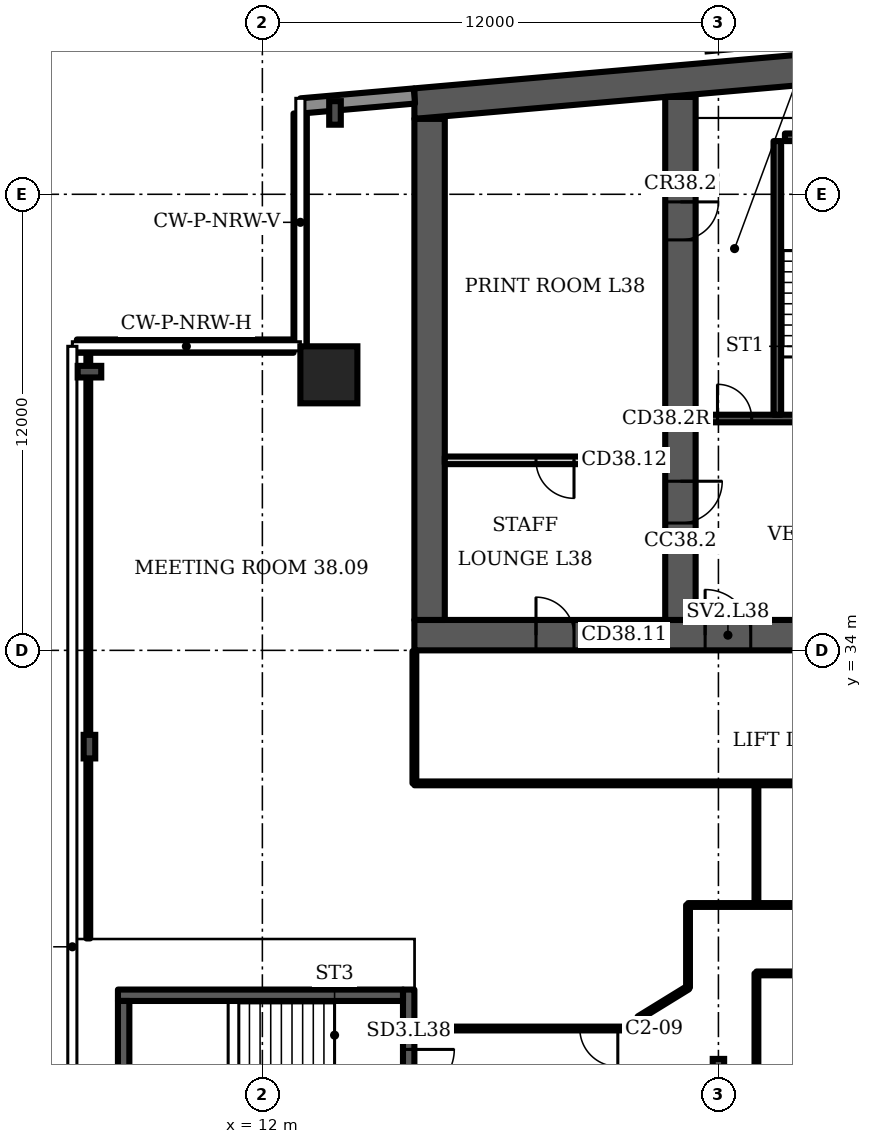
"""IFC4 building model, lengths in metres.
Left out: names, types, materials, properties, quantities, classifications, styles, units other than length and angle.
Written with IfcOpenShell. Run it as: python <this file> out.ifc"""

import sys

from ifc_helpers import new_model, si_unit, direction, frame, frame_2d, origin, origin_2d, place, context, subcontext, project, spatial, polyline, rectangle, i_section, outline, extrude, element, fill, save


model = new_model("IFC4")
c1 = context("Model", 3, precision=1e-05, world=origin(), true_north=direction((0.0, 1.0)))
c2 = subcontext(c1, "Body", "Model", "MODEL_VIEW")
j1 = project(units=[si_unit("LENGTHUNIT", "METRE"), si_unit("PLANEANGLEUNIT", "RADIAN")], contexts=[c1])
p1 = place(None, origin())
s1 = spatial("IfcSite", under=j1, at=p1, CompositionType="ELEMENT")
p2 = place(p1, origin())
s2 = spatial("IfcBuilding", under=s1, at=p2, CompositionType="ELEMENT")
p3 = place(p2, frame((0.0, 0.0, 159.1)))
s3 = spatial("IfcBuildingStorey", under=s2, at=p3, CompositionType="ELEMENT", Elevation=159.1)
p4 = place(p3, frame((0.0, 0.0, -0.0)))
e1 = element("IfcWall", 1, at=p4, inside=s3, PredefinedType="SHEAR", context=c2, shape_type="SweptSolid", body=[
    extrude(outline(polyline([(16.0, 47.984), (37.0, 49.822), (58.0, 47.984), (58.0, 48.787), (37.0, 50.625), (16.0, 48.787), (16.0, 47.984)])), origin(), (0.0, 0.0, 1.0), 3.6),
])
p5 = place(p3, frame((16.0, 34.4, 0.0), z_axis=(0.0, 0.0, 1.0), x_axis=(1.0, 0.0, 0.0)))
e2 = element("IfcWall", 2, at=p5, inside=s3, PredefinedType="SHEAR", context=c2, shape_type="SweptSolid", body=[
    extrude(rectangle(XDim=42.0, YDim=0.8, at=frame_2d((21.0, 0.0))), origin(), (0.0, 0.0, 1.0), 3.6),
])
p6 = place(p5, frame((3.2, 0.0, 0.0)))
e3 = element("IfcOpeningElement", 3, at=p6, cuts=e2, PredefinedType="OPENING", context=c2, shape_type="SweptSolid", body=[
    extrude(rectangle(XDim=1.0, YDim=2.1, at=frame_2d((0.5, 1.05))), frame((0.0, 0.41, 0.0), z_axis=(0.0, -1.0, 0.0), x_axis=(1.0, 0.0, 0.0)), (0.0, 0.0, 1.0), 0.82),
])
p7 = place(p5, frame((7.65, 0.0, 0.0)))
e4 = element("IfcOpeningElement", 4, at=p7, cuts=e2, PredefinedType="OPENING", context=c2, shape_type="SweptSolid", body=[
    extrude(rectangle(XDim=1.2, YDim=2.1, at=frame_2d((0.6, 1.05))), frame((0.0, 0.41, 0.0), z_axis=(0.0, -1.0, 0.0), x_axis=(1.0, 0.0, 0.0)), (0.0, 0.0, 1.0), 0.82),
])
p8 = place(p5, frame((14.767, 0.0, 0.0)))
e5 = element("IfcOpeningElement", 5, at=p8, cuts=e2, PredefinedType="OPENING", context=c2, shape_type="SweptSolid", body=[
    extrude(rectangle(XDim=1.1, YDim=2.1, at=frame_2d((0.55, 1.05))), frame((0.0, 0.41, 0.0), z_axis=(0.0, -1.0, 0.0), x_axis=(1.0, 0.0, 0.0)), (0.0, 0.0, 1.0), 0.82),
])
p9 = place(p5, frame((19.133, 0.0, 0.0)))
e6 = element("IfcOpeningElement", 6, at=p9, cuts=e2, PredefinedType="OPENING", context=c2, shape_type="SweptSolid", body=[
    extrude(rectangle(XDim=1.1, YDim=2.1, at=frame_2d((0.55, 1.05))), frame((0.0, 0.41, 0.0), z_axis=(0.0, -1.0, 0.0), x_axis=(1.0, 0.0, 0.0)), (0.0, 0.0, 1.0), 0.82),
])
p10 = place(p5, frame((16.8, 0.0, 0.0)))
e7 = element("IfcOpeningElement", 7, at=p10, cuts=e2, PredefinedType="OPENING", context=c2, shape_type="SweptSolid", body=[
    extrude(rectangle(XDim=1.4, YDim=2.1, at=frame_2d((0.7, 1.05))), frame((0.0, 0.41, 0.0), z_axis=(0.0, -1.0, 0.0), x_axis=(1.0, 0.0, 0.0)), (0.0, 0.0, 1.0), 0.82),
])
p11 = place(p5, frame((21.767, 0.0, 0.0)))
e8 = element("IfcOpeningElement", 8, at=p11, cuts=e2, PredefinedType="OPENING", context=c2, shape_type="SweptSolid", body=[
    extrude(rectangle(XDim=1.1, YDim=2.1, at=frame_2d((0.55, 1.05))), frame((0.0, 0.41, 0.0), z_axis=(0.0, -1.0, 0.0), x_axis=(1.0, 0.0, 0.0)), (0.0, 0.0, 1.0), 0.82),
])
p12 = place(p5, frame((23.95, 0.0, 0.0)))
e9 = element("IfcOpeningElement", 9, at=p12, cuts=e2, PredefinedType="OPENING", context=c2, shape_type="SweptSolid", body=[
    extrude(rectangle(XDim=1.1, YDim=2.1, at=frame_2d((0.55, 1.05))), frame((0.0, 0.41, 0.0), z_axis=(0.0, -1.0, 0.0), x_axis=(1.0, 0.0, 0.0)), (0.0, 0.0, 1.0), 0.82),
])
p13 = place(p5, frame((26.133, 0.0, 0.0)))
e10 = element("IfcOpeningElement", 10, at=p13, cuts=e2, PredefinedType="OPENING", context=c2, shape_type="SweptSolid", body=[
    extrude(rectangle(XDim=1.1, YDim=2.1, at=frame_2d((0.55, 1.05))), frame((0.0, 0.41, 0.0), z_axis=(0.0, -1.0, 0.0), x_axis=(1.0, 0.0, 0.0)), (0.0, 0.0, 1.0), 0.82),
])
p14 = place(p5, frame((33.15, 0.0, 0.0)))
e11 = element("IfcOpeningElement", 11, at=p14, cuts=e2, PredefinedType="OPENING", context=c2, shape_type="SweptSolid", body=[
    extrude(rectangle(XDim=1.2, YDim=2.1, at=frame_2d((0.6, 1.05))), frame((0.0, 0.41, 0.0), z_axis=(0.0, -1.0, 0.0), x_axis=(1.0, 0.0, 0.0)), (0.0, 0.0, 1.0), 0.82),
])
p15 = place(p5, frame((37.767, 0.0, 0.0)))
e12 = element("IfcOpeningElement", 12, at=p15, cuts=e2, PredefinedType="OPENING", context=c2, shape_type="SweptSolid", body=[
    extrude(rectangle(XDim=1.4, YDim=2.1, at=frame_2d((0.7, 1.05))), frame((0.0, 0.41, 0.0), z_axis=(0.0, -1.0, 0.0), x_axis=(1.0, 0.0, 0.0)), (0.0, 0.0, 1.0), 0.82),
])
p16 = place(p3, frame((16.4, 34.8, 0.0), z_axis=(0.0, 0.0, 1.0), x_axis=(0.0, 1.0, 0.0)))
e13 = element("IfcWall", 13, at=p16, inside=s3, PredefinedType="SHEAR", context=c2, shape_type="SweptSolid", body=[
    extrude(rectangle(XDim=13.184, YDim=0.8, at=frame_2d((6.592, 0.0))), origin(), (0.0, 0.0, 1.0), 3.6),
])
p17 = place(p3, frame((23.0, 34.8, 0.0), z_axis=(0.0, 0.0, 1.0), x_axis=(0.0, 1.0, 0.0)))
e14 = element("IfcWall", 14, at=p17, inside=s3, PredefinedType="SHEAR", context=c2, shape_type="SweptSolid", body=[
    extrude(rectangle(XDim=13.762, YDim=0.8, at=frame_2d((6.881, 0.0))), origin(), (0.0, 0.0, 1.0), 3.6),
])
p18 = place(p17, frame((2.55, 0.0, 0.0)))
e15 = element("IfcOpeningElement", 15, at=p18, cuts=e14, PredefinedType="OPENING", context=c2, shape_type="SweptSolid", body=[
    extrude(rectangle(XDim=1.1, YDim=2.1, at=frame_2d((0.55, 1.05))), frame((0.0, 0.41, 0.0), z_axis=(0.0, -1.0, 0.0), x_axis=(1.0, 0.0, 0.0)), (0.0, 0.0, 1.0), 0.82),
])
p19 = place(p17, frame((10.0, 0.0, 0.0)))
e16 = element("IfcOpeningElement", 16, at=p19, cuts=e14, PredefinedType="OPENING", context=c2, shape_type="SweptSolid", body=[
    extrude(rectangle(XDim=1.0, YDim=2.1, at=frame_2d((0.5, 1.05))), frame((0.0, 0.41, 0.0), z_axis=(0.0, -1.0, 0.0), x_axis=(1.0, 0.0, 0.0)), (0.0, 0.0, 1.0), 0.82),
])
p20 = place(p3, frame((13.75, 41.25, 0.0), z_axis=(0.0, 0.0, 1.0), x_axis=(1.0, 0.0, 0.0)))
e17 = element("IfcColumn", 17, at=p20, inside=s3, PredefinedType="COLUMN", context=c2, shape_type="SweptSolid", body=[
    extrude(rectangle(XDim=1.5, YDim=1.5, at=origin_2d()), origin(), (0.0, 0.0, 1.0), 3.6),
])
for number, where, z_axis, x_axis in (
    (18, (13.911, 48.141, 0.0), (0.0, 0.0, 1.0), (-1.0, 0.0, 0.0)),
    (19, (7.45, 41.333, 0.0), (0.0, 0.0, 1.0), (0.0, 1.0, 0.0)),
    (20, (7.45, 31.467, 0.0), (0.0, 0.0, 1.0), (-1.0, 0.0, 0.0)),
):
    element("IfcColumn", number, at=place(p3, frame(where, z_axis=z_axis, x_axis=x_axis)), inside=s3, PredefinedType="COLUMN", context=c2, shape_type="SweptSolid", body=[
        extrude(i_section(OverallWidth=0.305, OverallDepth=0.62, WebThickness=0.021, FlangeThickness=0.04, FilletRadius=0.027, at=origin_2d()), origin(), (0.0, 0.0, 1.0), 3.6),
    ])
p21 = place(p3, frame((24.0, 23.0, 0.0), z_axis=(0.0, 0.0, 1.0), x_axis=(1.0, 0.0, 0.0)))
e21 = element("IfcColumn", 21, at=p21, inside=s3, PredefinedType="COLUMN", context=c2, shape_type="SweptSolid", body=[
    extrude(i_section(OverallWidth=0.3, OverallDepth=0.5, WebThickness=0.014, FlangeThickness=0.028, FilletRadius=0.027, at=origin_2d()), origin(), (0.0, 0.0, 1.0), 3.6),
])
p22 = place(p3, frame((16.0, 48.587, 0.0), z_axis=(0.0, 0.0, 1.0), x_axis=(-0.996194, -0.087168, 0.0)))
e22 = element("IfcWall", 22, at=p22, inside=s3, PredefinedType="SOLIDWALL", context=c2, shape_type="SweptSolid", body=[
    extrude(rectangle(XDim=2.994, YDim=0.4, at=frame_2d((1.497, 0.0))), origin(), (0.0, 0.0, 1.0), 3.2),
])
p23 = place(p3, frame((12.995, 48.126, 0.0), z_axis=(0.0, 0.0, 1.0), x_axis=(0.0, -1.0, 0.0)))
e23 = element("IfcWall", 23, at=p23, inside=s3, PredefinedType="SOLIDWALL", context=c2, shape_type="SweptSolid", body=[
    extrude(rectangle(XDim=6.126, YDim=0.35, at=frame_2d((3.063, 0.0))), origin(), (0.0, 0.0, 1.0), 1.0),
])
p24 = place(p3, frame((12.82, 42.005, 0.0), z_axis=(0.0, 0.0, 1.0), x_axis=(-1.0, 0.0, 0.0)))
e24 = element("IfcWall", 24, at=p24, inside=s3, PredefinedType="SOLIDWALL", context=c2, shape_type="SweptSolid", body=[
    extrude(rectangle(XDim=5.7, YDim=0.35, at=frame_2d((2.85, 0.0))), origin(), (0.0, 0.0, 1.0), 1.0),
])
p25 = place(p3, frame((16.8, 39.0, 0.0), z_axis=(0.0, 0.0, 1.0), x_axis=(1.0, 0.0, 0.0)))
e25 = element("IfcWall", 25, at=p25, inside=s3, PredefinedType="PARTITIONING", context=c2, shape_type="SweptSolid", body=[
    extrude(rectangle(XDim=5.8, YDim=0.2, at=frame_2d((2.9, 0.0))), origin(), (0.0, 0.0, 1.0), 3.2),
])
p26 = place(p25, frame((2.4, 0.0, 0.0)))
e26 = element("IfcOpeningElement", 26, at=p26, cuts=e25, PredefinedType="OPENING", context=c2, shape_type="SweptSolid", body=[
    extrude(rectangle(XDim=1.0, YDim=2.1, at=frame_2d((0.5, 1.05))), frame((0.0, 0.11, 0.0), z_axis=(0.0, -1.0, 0.0), x_axis=(1.0, 0.0, 0.0)), (0.0, 0.0, 1.0), 0.22),
])
p27 = place(p3, frame((23.4, 40.1, 0.0), z_axis=(0.0, 0.0, 1.0), x_axis=(1.0, 0.0, 0.0)))
e27 = element("IfcWall", 27, at=p27, inside=s3, PredefinedType="SHEAR", context=c2, shape_type="SweptSolid", body=[
    extrude(rectangle(XDim=6.2, YDim=0.2, at=frame_2d((3.1, 0.0))), origin(), (0.0, 0.0, 1.0), 3.2),
])
p28 = place(p27, frame((3.525, 0.0, 0.0)))
e28 = element("IfcOpeningElement", 28, at=p28, cuts=e27, PredefinedType="OPENING", context=c2, shape_type="SweptSolid", body=[
    extrude(rectangle(XDim=1.2, YDim=2.1, at=frame_2d((0.6, 1.05))), frame((0.0, 0.11, 0.0), z_axis=(0.0, -1.0, 0.0), x_axis=(1.0, 0.0, 0.0)), (0.0, 0.0, 1.0), 0.22),
])
p29 = place(p27, frame((0.575, 0.0, 0.0)))
e29 = element("IfcOpeningElement", 29, at=p29, cuts=e27, PredefinedType="OPENING", context=c2, shape_type="SweptSolid", body=[
    extrude(rectangle(XDim=0.9, YDim=2.1, at=frame_2d((0.45, 1.05))), frame((0.0, 0.11, 0.0), z_axis=(0.0, -1.0, 0.0), x_axis=(1.0, 0.0, 0.0)), (0.0, 0.0, 1.0), 0.22),
])
p30 = place(p3, frame((25.55, 40.2, 0.0), z_axis=(0.0, 0.0, 1.0), x_axis=(0.0, 1.0, 0.0)))
e30 = element("IfcWall", 30, at=p30, inside=s3, PredefinedType="SHEAR", context=c2, shape_type="SweptSolid", body=[
    extrude(rectangle(XDim=7.2, YDim=0.2, at=frame_2d((3.6, 0.0))), origin(), (0.0, 0.0, 1.0), 3.2),
])
p31 = place(p3, frame((25.75, 47.5, 0.0), z_axis=(0.0, 0.0, 1.0), x_axis=(1.0, 0.0, 0.0)))
e31 = element("IfcWall", 31, at=p31, inside=s3, PredefinedType="SHEAR", context=c2, shape_type="SweptSolid", body=[
    extrude(rectangle(XDim=3.85, YDim=0.2, at=frame_2d((1.925, 0.0))), origin(), (0.0, 0.0, 1.0), 3.2),
])
p32 = place(p3, frame((15.85, 20.725, 0.0), z_axis=(0.0, 0.0, 1.0), x_axis=(0.0, 1.0, 0.0)))
e32 = element("IfcWall", 32, at=p32, inside=s3, PredefinedType="SHEAR", context=c2, shape_type="SweptSolid", body=[
    extrude(rectangle(XDim=4.35, YDim=0.3, at=frame_2d((2.175, 0.0))), origin(), (0.0, 0.0, 1.0), 3.2),
])
p33 = place(p32, frame((1.575, 0.0, 0.0)))
e33 = element("IfcOpeningElement", 33, at=p33, cuts=e32, PredefinedType="OPENING", context=c2, shape_type="SweptSolid", body=[
    extrude(rectangle(XDim=1.2, YDim=2.1, at=frame_2d((0.6, 1.05))), frame((0.0, 0.16, 0.0), z_axis=(0.0, -1.0, 0.0), x_axis=(1.0, 0.0, 0.0)), (0.0, 0.0, 1.0), 0.32),
])
p34 = place(p3, frame((7.42, 26.42, 0.0), z_axis=(0.0, 0.0, 1.0), x_axis=(0.0, 1.0, 0.0)))
e34 = element("IfcWall", 34, at=p34, inside=s3, PredefinedType="PARTITIONING", context=c2, shape_type="SweptSolid", body=[
    extrude(rectangle(XDim=15.56, YDim=0.1, at=frame_2d((7.78, 0.0))), origin(), (0.0, 0.0, 1.0), 2.58),
])
p35 = place(p3, frame((16.0, 30.5, 0.0), z_axis=(0.0, 0.0, 1.0), x_axis=(0.0, 1.0, 0.0)))
e35 = element("IfcWall", 35, at=p35, inside=s3, PredefinedType="PARTITIONING", context=c2, shape_type="SweptSolid", body=[
    extrude(rectangle(XDim=3.48, YDim=0.1, at=frame_2d((1.74, 0.0))), origin(), (0.0, 0.0, 1.0), 3.2),
])
p36 = place(p3, frame((16.0, 30.5, 0.0), z_axis=(0.0, 0.0, 1.0), x_axis=(1.0, 0.0, 0.0)))
e36 = element("IfcWall", 36, at=p36, inside=s3, PredefinedType="PARTITIONING", context=c2, shape_type="SweptSolid", body=[
    extrude(rectangle(XDim=20.85, YDim=0.1, at=frame_2d((10.425, 0.0))), origin(), (0.0, 0.0, 1.0), 3.2),
])
p37 = place(p36, frame((14.42, 0.0, 0.0)))
e37 = element("IfcOpeningElement", 37, at=p37, cuts=e36, PredefinedType="OPENING", context=c2, shape_type="SweptSolid", body=[
    extrude(rectangle(XDim=1.0, YDim=2.1, at=frame_2d((0.5, 1.05))), frame((0.0, 0.06, 0.0), z_axis=(0.0, -1.0, 0.0), x_axis=(1.0, 0.0, 0.0)), (0.0, 0.0, 1.0), 0.12),
])
p38 = place(p3, frame((16.02, 24.05, 0.0), z_axis=(0.0, 0.0, 1.0), x_axis=(1.0, 0.0, 0.0)))
e38 = element("IfcWall", 38, at=p38, inside=s3, PredefinedType="PARTITIONING", context=c2, shape_type="SweptSolid", body=[
    extrude(rectangle(XDim=5.855, YDim=0.1, at=frame_2d((2.927, 0.0))), origin(), (0.0, 0.0, 1.0), 3.2),
])
p39 = place(p38, frame((4.333, 0.0, 0.0)))
e39 = element("IfcOpeningElement", 39, at=p39, cuts=e38, PredefinedType="OPENING", context=c2, shape_type="SweptSolid", body=[
    extrude(rectangle(XDim=1.0, YDim=2.1, at=frame_2d((0.5, 1.05))), frame((0.0, 0.06, 0.0), z_axis=(0.0, -1.0, 0.0), x_axis=(1.0, 0.0, 0.0)), (0.0, 0.0, 1.0), 0.12),
])
p40 = place(p3, frame((21.9, 24.325, 0.0), z_axis=(0.0, 0.0, 1.0), x_axis=(0.851649, 0.524104, 0.0)))
e40 = element("IfcWall", 40, at=p40, inside=s3, PredefinedType="PARTITIONING", context=c2, shape_type="SweptSolid", body=[
    extrude(rectangle(XDim=1.527, YDim=0.1, at=frame_2d((0.763, 0.0))), origin(), (0.0, 0.0, 1.0), 3.2),
])
p41 = place(p3, frame((23.2, 25.125, 0.0), z_axis=(0.0, 0.0, 1.0), x_axis=(0.0, 1.0, 0.0)))
e41 = element("IfcWall", 41, at=p41, inside=s3, PredefinedType="PARTITIONING", context=c2, shape_type="SweptSolid", body=[
    extrude(rectangle(XDim=2.175, YDim=0.1, at=frame_2d((1.087, 0.0))), origin(), (0.0, 0.0, 1.0), 3.2),
])
p42 = place(p3, frame((23.2, 27.3, 0.0), z_axis=(0.0, 0.0, 1.0), x_axis=(1.0, 0.0, 0.0)))
e42 = element("IfcWall", 42, at=p42, inside=s3, PredefinedType="PARTITIONING", context=c2, shape_type="SweptSolid", body=[
    extrude(rectangle(XDim=33.9, YDim=0.1, at=frame_2d((16.95, 0.0))), origin(), (0.0, 0.0, 1.0), 3.2),
])
p43 = place(p42, frame((16.3, 0.0, 0.0)))
e43 = element("IfcOpeningElement", 43, at=p43, cuts=e42, PredefinedType="OPENING", context=c2, shape_type="SweptSolid", body=[
    extrude(rectangle(XDim=1.0, YDim=2.1, at=frame_2d((0.5, 1.05))), frame((0.0, 0.06, 0.0), z_axis=(0.0, -1.0, 0.0), x_axis=(1.0, 0.0, 0.0)), (0.0, 0.0, 1.0), 0.12),
])
p44 = place(p42, frame((20.72, 0.0, 0.0)))
e44 = element("IfcOpeningElement", 44, at=p44, cuts=e42, PredefinedType="OPENING", context=c2, shape_type="SweptSolid", body=[
    extrude(rectangle(XDim=1.0, YDim=2.1, at=frame_2d((0.5, 1.05))), frame((0.0, 0.06, 0.0), z_axis=(0.0, -1.0, 0.0), x_axis=(1.0, 0.0, 0.0)), (0.0, 0.0, 1.0), 0.12),
])
p45 = place(p42, frame((23.54, 0.0, 0.0)))
e45 = element("IfcOpeningElement", 45, at=p45, cuts=e42, PredefinedType="OPENING", context=c2, shape_type="SweptSolid", body=[
    extrude(rectangle(XDim=1.0, YDim=2.1, at=frame_2d((0.5, 1.05))), frame((0.0, 0.06, 0.0), z_axis=(0.0, -1.0, 0.0), x_axis=(1.0, 0.0, 0.0)), (0.0, 0.0, 1.0), 0.12),
])
p46 = place(p42, frame((26.36, 0.0, 0.0)))
e46 = element("IfcOpeningElement", 46, at=p46, cuts=e42, PredefinedType="OPENING", context=c2, shape_type="SweptSolid", body=[
    extrude(rectangle(XDim=1.0, YDim=2.1, at=frame_2d((0.5, 1.05))), frame((0.0, 0.06, 0.0), z_axis=(0.0, -1.0, 0.0), x_axis=(1.0, 0.0, 0.0)), (0.0, 0.0, 1.0), 0.12),
])
p47 = place(p42, frame((29.18, 0.0, 0.0)))
e47 = element("IfcOpeningElement", 47, at=p47, cuts=e42, PredefinedType="OPENING", context=c2, shape_type="SweptSolid", body=[
    extrude(rectangle(XDim=1.0, YDim=2.1, at=frame_2d((0.5, 1.05))), frame((0.0, 0.06, 0.0), z_axis=(0.0, -1.0, 0.0), x_axis=(1.0, 0.0, 0.0)), (0.0, 0.0, 1.0), 0.12),
])
p48 = place(p42, frame((32.0, 0.0, 0.0)))
e48 = element("IfcOpeningElement", 48, at=p48, cuts=e42, PredefinedType="OPENING", context=c2, shape_type="SweptSolid", body=[
    extrude(rectangle(XDim=1.0, YDim=2.1, at=frame_2d((0.5, 1.05))), frame((0.0, 0.06, 0.0), z_axis=(0.0, -1.0, 0.0), x_axis=(1.0, 0.0, 0.0)), (0.0, 0.0, 1.0), 0.12),
])
p49 = place(p3, frame((25.0, 27.3, 0.0), z_axis=(0.0, 0.0, 1.0), x_axis=(0.0, 1.0, 0.0)))
e49 = element("IfcWall", 49, at=p49, inside=s3, PredefinedType="PARTITIONING", context=c2, shape_type="SweptSolid", body=[
    extrude(rectangle(XDim=3.2, YDim=0.1, at=frame_2d((1.6, 0.0))), origin(), (0.0, 0.0, 1.0), 3.2),
])
p50 = place(p3, frame((25.0, 13.675, 0.0), z_axis=(0.0, 0.0, 1.0), x_axis=(0.0, 1.0, 0.0)))
e50 = element("IfcWall", 50, at=p50, inside=s3, PredefinedType="PARTITIONING", context=c2, shape_type="SweptSolid", body=[
    extrude(rectangle(XDim=11.825, YDim=0.1, at=frame_2d((5.913, 0.0))), origin(), (0.0, 0.0, 1.0), 3.2),
])
p51 = place(p3, frame((25.0, 25.5, 0.0), z_axis=(0.0, 0.0, 1.0), x_axis=(1.0, 0.0, 0.0)))
e51 = element("IfcWall", 51, at=p51, inside=s3, PredefinedType="PARTITIONING", context=c2, shape_type="SweptSolid", body=[
    extrude(rectangle(XDim=36.705, YDim=0.1, at=frame_2d((18.353, 0.0))), origin(), (0.0, 0.0, 1.0), 3.2),
])
p52 = place(p51, frame((5.02, 0.0, 0.0)))
e52 = element("IfcOpeningElement", 52, at=p52, cuts=e51, PredefinedType="OPENING", context=c2, shape_type="SweptSolid", body=[
    extrude(rectangle(XDim=1.8, YDim=2.1, at=frame_2d((0.9, 1.05))), frame((0.0, 0.06, 0.0), z_axis=(0.0, -1.0, 0.0), x_axis=(1.0, 0.0, 0.0)), (0.0, 0.0, 1.0), 0.12),
])
p53 = place(p3, frame((8.2, 24.925, 0.0), z_axis=(0.0, 0.0, 1.0), x_axis=(1.0, 0.0, 0.0)))
e53 = element("IfcWall", 53, at=p53, inside=s3, PredefinedType="SHEAR", context=c2, shape_type="SweptSolid", body=[
    extrude(rectangle(XDim=7.5, YDim=0.3, at=frame_2d((3.75, 0.0))), origin(), (0.0, 0.0, 1.0), 3.2),
])
p54 = place(p3, frame((8.35, 21.025, 0.0), z_axis=(0.0, 0.0, 1.0), x_axis=(0.0, 1.0, 0.0)))
e54 = element("IfcWall", 54, at=p54, inside=s3, PredefinedType="SHEAR", context=c2, shape_type="SweptSolid", body=[
    extrude(rectangle(XDim=3.75, YDim=0.3, at=frame_2d((1.875, 0.0))), origin(), (0.0, 0.0, 1.0), 3.2),
])
p55 = place(p6, origin())
e55 = element("IfcDoor", 55, at=p55, inside=s3, OperationType="SINGLE_SWING_LEFT", PredefinedType="DOOR", context=c2, shape_type="SweptSolid", body=[
    extrude(rectangle(XDim=1.0, YDim=2.1, at=frame_2d((0.5, 1.05))), frame((0.0, 0.4, 0.0), z_axis=(0.0, -1.0, 0.0), x_axis=(1.0, 0.0, 0.0)), (0.0, 0.0, 1.0), 0.8),
])
fill(e3, e55)
p56 = place(p26, origin())
e56 = element("IfcDoor", 56, at=p56, inside=s3, OperationType="SINGLE_SWING_RIGHT", PredefinedType="DOOR", context=c2, shape_type="SweptSolid", body=[
    extrude(rectangle(XDim=1.0, YDim=2.1, at=frame_2d((0.5, 1.05))), frame((0.0, 0.025, 0.0), z_axis=(0.0, -1.0, 0.0), x_axis=(1.0, 0.0, 0.0)), (0.0, 0.0, 1.0), 0.05),
])
fill(e26, e56)
p57 = place(p29, origin())
e57 = element("IfcDoor", 57, at=p57, inside=s3, OperationType="SINGLE_SWING_LEFT", PredefinedType="DOOR", context=c2, shape_type="SweptSolid", body=[
    extrude(rectangle(XDim=0.9, YDim=2.1, at=frame_2d((0.45, 1.05))), frame((0.0, 0.025, 0.0), z_axis=(0.0, -1.0, 0.0), x_axis=(1.0, 0.0, 0.0)), (0.0, 0.0, 1.0), 0.05),
])
fill(e29, e57)
p58 = place(p7, origin())
e58 = element("IfcDoor", 58, at=p58, inside=s3, OperationType="SINGLE_SWING_LEFT", PredefinedType="DOOR", context=c2, shape_type="SweptSolid", body=[
    extrude(rectangle(XDim=1.2, YDim=2.1, at=frame_2d((0.6, 1.05))), frame((0.0, 0.025, 0.0), z_axis=(0.0, -1.0, 0.0), x_axis=(1.0, 0.0, 0.0)), (0.0, 0.0, 1.0), 0.05),
])
fill(e4, e58)
p59 = place(p18, origin())
e59 = element("IfcDoor", 59, at=p59, inside=s3, OperationType="SINGLE_SWING_RIGHT", PredefinedType="DOOR", context=c2, shape_type="SweptSolid", body=[
    extrude(rectangle(XDim=1.1, YDim=2.1, at=frame_2d((0.55, 1.05))), frame((0.0, 0.025, 0.0), z_axis=(0.0, -1.0, 0.0), x_axis=(1.0, 0.0, 0.0)), (0.0, 0.0, 1.0), 0.05),
])
fill(e15, e59)
p60 = place(p19, origin())
e60 = element("IfcDoor", 60, at=p60, inside=s3, OperationType="SINGLE_SWING_RIGHT", PredefinedType="DOOR", context=c2, shape_type="SweptSolid", body=[
    extrude(rectangle(XDim=1.0, YDim=2.1, at=frame_2d((0.5, 1.05))), frame((0.0, 0.4, 0.0), z_axis=(0.0, -1.0, 0.0), x_axis=(1.0, 0.0, 0.0)), (0.0, 0.0, 1.0), 0.8),
])
fill(e16, e60)
p61 = place(p33, origin())
e61 = element("IfcDoor", 61, at=p61, inside=s3, OperationType="SINGLE_SWING_RIGHT", PredefinedType="DOOR", context=c2, shape_type="SweptSolid", body=[
    extrude(rectangle(XDim=1.2, YDim=2.1, at=frame_2d((0.6, 1.05))), frame((0.0, 0.025, 0.0), z_axis=(0.0, -1.0, 0.0), x_axis=(1.0, 0.0, 0.0)), (0.0, 0.0, 1.0), 0.05),
])
fill(e33, e61)
p62 = place(p39, origin())
e62 = element("IfcDoor", 62, at=p62, inside=s3, OperationType="SINGLE_SWING_RIGHT", PredefinedType="DOOR", context=c2, shape_type="SweptSolid", body=[
    extrude(rectangle(XDim=1.0, YDim=2.1, at=frame_2d((0.5, 1.05))), frame((0.0, 0.025, 0.0), z_axis=(0.0, -1.0, 0.0), x_axis=(1.0, 0.0, 0.0)), (0.0, 0.0, 1.0), 0.05),
])
fill(e39, e62)
save(model, sys.argv[1])
